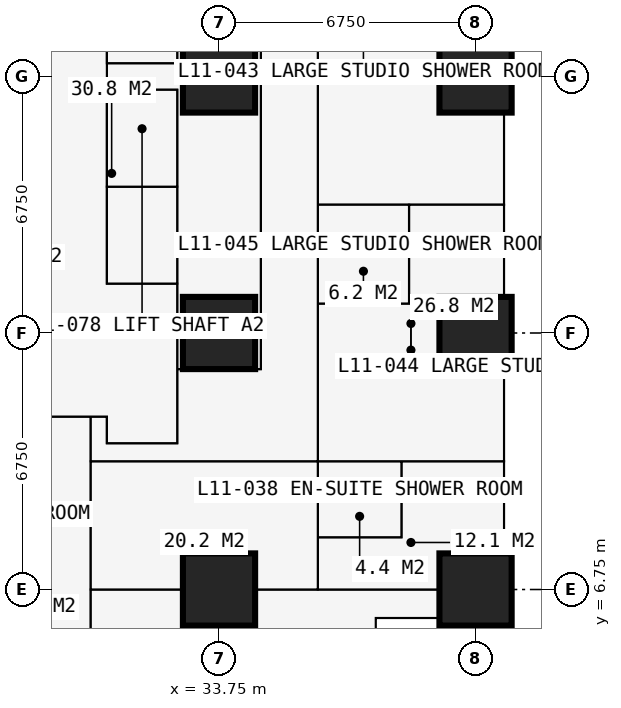
"""IFC4 building model, lengths in metres.
Left out: names, types, materials, properties, quantities, classifications, styles, units other than length and angle.
Written with IfcOpenShell. Run it as: python <this file> out.ifc"""

import sys

from ifc_helpers import new_model, si_unit, direction, frame, frame_2d, origin, origin_2d, place, context, subcontext, project, spatial, rectangle, extrude, element, fill, save


model = new_model("IFC4")
c1 = context("Model", 3, precision=1e-05, world=origin(), true_north=direction((0.0, 1.0)))
c2 = subcontext(c1, "Body", "Model", "MODEL_VIEW")
j1 = project(units=[si_unit("LENGTHUNIT", "METRE"), si_unit("PLANEANGLEUNIT", "RADIAN")], contexts=[c1])
p1 = place(None, origin())
s1 = spatial("IfcSite", under=j1, at=p1, CompositionType="ELEMENT")
p2 = place(p1, origin())
s2 = spatial("IfcBuilding", under=s1, at=p2, CompositionType="ELEMENT")
p3 = place(p2, frame((0.0, 0.0, 43.2)))
s3 = spatial("IfcBuildingStorey", under=s2, at=p3, CompositionType="ELEMENT", Elevation=43.2)
for number, where, z_axis, x_axis in (
    (1, (33.75, 6.75, 0.0), (0.0, 0.0, 1.0), (1.0, 0.0, 0.0)),
    (2, (33.75, 13.5, 0.0), (0.0, 0.0, 1.0), (1.0, 0.0, 0.0)),
    (3, (33.75, 20.25, 0.0), (0.0, 0.0, 1.0), (1.0, 0.0, 0.0)),
    (4, (40.5, 6.75, 0.0), (0.0, 0.0, 1.0), (1.0, 0.0, 0.0)),
    (5, (40.5, 13.5, 0.0), (0.0, 0.0, 1.0), (1.0, 0.0, 0.0)),
    (6, (40.5, 20.25, 0.0), (0.0, 0.0, 1.0), (1.0, 0.0, 0.0)),
):
    element("IfcColumn", number, at=place(p3, frame(where, z_axis=z_axis, x_axis=x_axis)), inside=s3, PredefinedType="COLUMN", context=c2, shape_type="SweptSolid", body=[
        extrude(rectangle(XDim=1.9, YDim=1.9, at=origin_2d()), origin(), (0.0, 0.0, 1.0), 3.6),
    ])
p4 = place(p3, frame((41.25, 27.0, 0.0), z_axis=(0.0, 0.0, 1.0), x_axis=(0.0, -1.0, 0.0)))
e7 = element("IfcWall", 7, at=p4, inside=s3, PredefinedType="SOLIDWALL", context=c2, shape_type="SweptSolid", body=[
    extrude(rectangle(XDim=6.75, YDim=0.15, at=frame_2d((3.375, 0.0))), origin(), (0.0, 0.0, 1.0), 3.375),
])
p5 = place(p4, frame((0.996, 0.0, 0.0)))
e8 = element("IfcOpeningElement", 8, at=p5, cuts=e7, PredefinedType="OPENING", context=c2, shape_type="SweptSolid", body=[
    extrude(rectangle(XDim=1.0, YDim=2.2, at=frame_2d((0.5, 1.1))), frame((0.0, 0.085, 0.0), z_axis=(0.0, -1.0, 0.0), x_axis=(1.0, 0.0, 0.0)), (0.0, 0.0, 1.0), 0.17),
])
p6 = place(p4, frame((2.042, 0.0, 0.9)))
e9 = element("IfcOpeningElement", 9, at=p6, cuts=e7, PredefinedType="OPENING", context=c2, shape_type="SweptSolid", body=[
    extrude(rectangle(XDim=1.2, YDim=1.8, at=frame_2d((0.6, 0.9))), frame((0.0, 0.085, 0.0), z_axis=(0.0, -1.0, 0.0), x_axis=(1.0, 0.0, 0.0)), (0.0, 0.0, 1.0), 0.17),
])
p7 = place(p4, frame((4.754, 0.0, 0.0)))
e10 = element("IfcOpeningElement", 10, at=p7, cuts=e7, PredefinedType="OPENING", context=c2, shape_type="SweptSolid", body=[
    extrude(rectangle(XDim=1.0, YDim=2.2, at=frame_2d((0.5, 1.1))), frame((0.0, 0.085, 0.0), z_axis=(0.0, -1.0, 0.0), x_axis=(1.0, 0.0, 0.0)), (0.0, 0.0, 1.0), 0.17),
])
p8 = place(p4, frame((3.508, 0.0, 0.9)))
e11 = element("IfcOpeningElement", 11, at=p8, cuts=e7, PredefinedType="OPENING", context=c2, shape_type="SweptSolid", body=[
    extrude(rectangle(XDim=1.2, YDim=1.8, at=frame_2d((0.6, 0.9))), frame((0.0, 0.085, 0.0), z_axis=(0.0, -1.0, 0.0), x_axis=(1.0, 0.0, 0.0)), (0.0, 0.0, 1.0), 0.17),
])
p9 = place(p3, frame((37.875, 2.625, 0.0), z_axis=(0.0, 0.0, 1.0), x_axis=(0.0, 1.0, 0.0)))
e12 = element("IfcWall", 12, at=p9, inside=s3, PredefinedType="SOLIDWALL", context=c2, shape_type="SweptSolid", body=[
    extrude(rectangle(XDim=3.375, YDim=0.3, at=frame_2d((1.688, 0.0))), origin(), (0.0, 0.0, 1.0), 3.375),
])
p10 = place(p9, frame((0.788, 0.0, 0.6)))
e13 = element("IfcOpeningElement", 13, at=p10, cuts=e12, PredefinedType="OPENING", context=c2, shape_type="SweptSolid", body=[
    extrude(rectangle(XDim=1.8, YDim=2.1, at=frame_2d((0.9, 1.05))), frame((0.0, 0.16, 0.0), z_axis=(0.0, -1.0, 0.0), x_axis=(1.0, 0.0, 0.0)), (0.0, 0.0, 1.0), 0.32),
])
p11 = place(p3, frame((37.875, 6.0, 0.0), z_axis=(0.0, 0.0, 1.0), x_axis=(1.0, 0.0, 0.0)))
e14 = element("IfcWall", 14, at=p11, inside=s3, PredefinedType="SOLIDWALL", context=c2, shape_type="SweptSolid", body=[
    extrude(rectangle(XDim=3.375, YDim=0.3, at=frame_2d((1.688, 0.0))), origin(), (0.0, 0.0, 1.0), 3.375),
])
p12 = place(p11, frame((0.317, 0.0, 0.9)))
e15 = element("IfcOpeningElement", 15, at=p12, cuts=e14, PredefinedType="OPENING", context=c2, shape_type="SweptSolid", body=[
    extrude(rectangle(XDim=1.2, YDim=1.8, at=frame_2d((0.6, 0.9))), frame((0.0, 0.16, 0.0), z_axis=(0.0, -1.0, 0.0), x_axis=(1.0, 0.0, 0.0)), (0.0, 0.0, 1.0), 0.32),
])
p13 = place(p3, frame((10.125, 11.3, 0.0), z_axis=(0.0, 0.0, 1.0), x_axis=(1.0, 0.0, 0.0)))
e16 = element("IfcWall", 16, at=p13, inside=s3, PredefinedType="PARTITIONING", context=c2, shape_type="SweptSolid", body=[
    extrude(rectangle(XDim=20.675, YDim=0.15, at=frame_2d((10.337, 0.0))), origin(), (0.0, 0.0, 1.0), 3.375),
])
p14 = place(p13, frame((8.375, 0.0, 0.0)))
e17 = element("IfcOpeningElement", 17, at=p14, cuts=e16, PredefinedType="OPENING", context=c2, shape_type="SweptSolid", body=[
    extrude(rectangle(XDim=1.0, YDim=2.2, at=frame_2d((0.5, 1.1))), frame((0.0, 0.085, 0.0), z_axis=(0.0, -1.0, 0.0), x_axis=(1.0, 0.0, 0.0)), (0.0, 0.0, 1.0), 0.17),
])
p15 = place(p13, frame((10.975, 0.0, 0.0)))
e18 = element("IfcOpeningElement", 18, at=p15, cuts=e16, PredefinedType="OPENING", context=c2, shape_type="SweptSolid", body=[
    extrude(rectangle(XDim=1.0, YDim=2.2, at=frame_2d((0.5, 1.1))), frame((0.0, 0.085, 0.0), z_axis=(0.0, -1.0, 0.0), x_axis=(1.0, 0.0, 0.0)), (0.0, 0.0, 1.0), 0.17),
])
p16 = place(p13, frame((3.925, 0.0, 0.0)))
e19 = element("IfcOpeningElement", 19, at=p16, cuts=e16, PredefinedType="OPENING", context=c2, shape_type="SweptSolid", body=[
    extrude(rectangle(XDim=0.95, YDim=2.2, at=frame_2d((0.475, 1.1))), frame((0.0, 0.085, 0.0), z_axis=(0.0, -1.0, 0.0), x_axis=(1.0, 0.0, 0.0)), (0.0, 0.0, 1.0), 0.17),
])
p17 = place(p3, frame((30.375, -0.734, 0.0), z_axis=(0.0, 0.0, 1.0), x_axis=(0.0, 1.0, 0.0)))
e20 = element("IfcWall", 20, at=p17, inside=s3, PredefinedType="PARTITIONING", context=c2, shape_type="SweptSolid", body=[
    extrude(rectangle(XDim=12.034, YDim=0.15, at=frame_2d((6.017, 0.0))), origin(), (0.0, 0.0, 1.0), 3.375),
])
p18 = place(p3, frame((30.375, 6.75, 0.0), z_axis=(0.0, 0.0, 1.0), x_axis=(1.0, 0.0, 0.0)))
e21 = element("IfcWall", 21, at=p18, inside=s3, PredefinedType="PARTITIONING", context=c2, shape_type="SweptSolid", body=[
    extrude(rectangle(XDim=10.859, YDim=0.15, at=frame_2d((5.429, 0.0))), origin(), (0.0, 0.0, 1.0), 2.877),
])
p19 = place(p18, frame((1.4, 0.0, 0.0)))
e22 = element("IfcOpeningElement", 22, at=p19, cuts=e21, PredefinedType="OPENING", context=c2, shape_type="SweptSolid", body=[
    extrude(rectangle(XDim=1.0, YDim=2.2, at=frame_2d((0.5, 1.1))), frame((0.0, 0.085, 0.0), z_axis=(0.0, -1.0, 0.0), x_axis=(1.0, 0.0, 0.0)), (0.0, 0.0, 1.0), 0.17),
])
p20 = place(p3, frame((30.375, 10.125, 0.0), z_axis=(0.0, 0.0, 1.0), x_axis=(1.0, 0.0, 0.0)))
e23 = element("IfcWall", 23, at=p20, inside=s3, PredefinedType="PARTITIONING", context=c2, shape_type="SweptSolid", body=[
    extrude(rectangle(XDim=10.859, YDim=0.15, at=frame_2d((5.429, 0.0))), origin(), (0.0, 0.0, 1.0), 3.375),
])
p21 = place(p20, frame((2.5, 0.0, 0.0)))
e24 = element("IfcOpeningElement", 24, at=p21, cuts=e23, PredefinedType="OPENING", context=c2, shape_type="SweptSolid", body=[
    extrude(rectangle(XDim=1.0, YDim=2.2, at=frame_2d((0.5, 1.1))), frame((0.0, 0.085, 0.0), z_axis=(0.0, -1.0, 0.0), x_axis=(1.0, 0.0, 0.0)), (0.0, 0.0, 1.0), 0.17),
])
p22 = place(p3, frame((30.8, 10.6, 0.0), z_axis=(0.0, 0.0, 1.0), x_axis=(0.0, 1.0, 0.0)))
e25 = element("IfcWall", 25, at=p22, inside=s3, PredefinedType="PARTITIONING", context=c2, shape_type="SweptSolid", body=[
    extrude(rectangle(XDim=0.7, YDim=0.15, at=frame_2d((0.35, 0.0))), origin(), (0.0, 0.0, 1.0), 3.375),
])
p23 = place(p3, frame((30.8, 10.6, 0.0), z_axis=(0.0, 0.0, 1.0), x_axis=(1.0, 0.0, 0.0)))
e26 = element("IfcWall", 26, at=p23, inside=s3, PredefinedType="PARTITIONING", context=c2, shape_type="SweptSolid", body=[
    extrude(rectangle(XDim=1.85, YDim=0.15, at=frame_2d((0.925, 0.0))), origin(), (0.0, 0.0, 1.0), 3.375),
])
p24 = place(p3, frame((30.8, 14.8, 0.0), z_axis=(0.0, 0.0, 1.0), x_axis=(0.0, 1.0, 0.0)))
e27 = element("IfcWall", 27, at=p24, inside=s3, PredefinedType="PARTITIONING", context=c2, shape_type="SweptSolid", body=[
    extrude(rectangle(XDim=10.9, YDim=0.15, at=frame_2d((5.45, 0.0))), origin(), (0.0, 0.0, 1.0), 3.375),
])
p25 = place(p24, frame((0.75, 0.0, 0.0)))
e28 = element("IfcOpeningElement", 28, at=p25, cuts=e27, PredefinedType="OPENING", context=c2, shape_type="SweptSolid", body=[
    extrude(rectangle(XDim=1.1, YDim=2.2, at=frame_2d((0.55, 1.1))), frame((0.0, 0.085, 0.0), z_axis=(0.0, -1.0, 0.0), x_axis=(1.0, 0.0, 0.0)), (0.0, 0.0, 1.0), 0.17),
])
p26 = place(p24, frame((3.25, 0.0, 0.0)))
e29 = element("IfcOpeningElement", 29, at=p26, cuts=e27, PredefinedType="OPENING", context=c2, shape_type="SweptSolid", body=[
    extrude(rectangle(XDim=1.1, YDim=2.2, at=frame_2d((0.55, 1.1))), frame((0.0, 0.085, 0.0), z_axis=(0.0, -1.0, 0.0), x_axis=(1.0, 0.0, 0.0)), (0.0, 0.0, 1.0), 0.17),
])
p27 = place(p24, frame((6.5, 0.0, 0.0)))
e30 = element("IfcOpeningElement", 30, at=p27, cuts=e27, PredefinedType="OPENING", context=c2, shape_type="SweptSolid", body=[
    extrude(rectangle(XDim=1.1, YDim=2.2, at=frame_2d((0.55, 1.1))), frame((0.0, 0.085, 0.0), z_axis=(0.0, -1.0, 0.0), x_axis=(1.0, 0.0, 0.0)), (0.0, 0.0, 1.0), 0.17),
])
p28 = place(p24, frame((9.05, 0.0, 0.0)))
e31 = element("IfcOpeningElement", 31, at=p28, cuts=e27, PredefinedType="OPENING", context=c2, shape_type="SweptSolid", body=[
    extrude(rectangle(XDim=1.1, YDim=2.2, at=frame_2d((0.55, 1.1))), frame((0.0, 0.085, 0.0), z_axis=(0.0, -1.0, 0.0), x_axis=(1.0, 0.0, 0.0)), (0.0, 0.0, 1.0), 0.17),
])
for number, where, z_axis, x_axis in (
    (32, (30.8, 14.8, 0.0), (0.0, 0.0, 1.0), (1.0, 0.0, 0.0)),
    (33, (30.8, 17.35, 0.0), (0.0, 0.0, 1.0), (1.0, 0.0, 0.0)),
    (34, (30.8, 19.9, 0.0), (0.0, 0.0, 1.0), (1.0, 0.0, 0.0)),
    (35, (30.8, 20.6, 0.0), (0.0, 0.0, 1.0), (1.0, 0.0, 0.0)),
):
    element("IfcWall", number, at=place(p3, frame(where, z_axis=z_axis, x_axis=x_axis)), inside=s3, PredefinedType="SHEAR", context=c2, shape_type="SweptSolid", body=[
        extrude(rectangle(XDim=1.85, YDim=0.1, at=frame_2d((0.925, 0.0))), origin(), (0.0, 0.0, 1.0), 3.375),
    ])
p29 = place(p3, frame((32.65, 10.6, 0.0), z_axis=(0.0, 0.0, 1.0), x_axis=(0.0, 1.0, 0.0)))
e36 = element("IfcWall", 36, at=p29, inside=s3, PredefinedType="SHEAR", context=c2, shape_type="SweptSolid", body=[
    extrude(rectangle(XDim=9.3, YDim=0.1, at=frame_2d((4.65, 0.0))), origin(), (0.0, 0.0, 1.0), 3.375),
])
p30 = place(p29, frame((0.5, 0.0, 0.0)))
e37 = element("IfcOpeningElement", 37, at=p30, cuts=e36, PredefinedType="OPENING", context=c2, shape_type="SweptSolid", body=[
    extrude(rectangle(XDim=1.0, YDim=2.2, at=frame_2d((0.5, 1.1))), frame((0.0, 0.06, 0.0), z_axis=(0.0, -1.0, 0.0), x_axis=(1.0, 0.0, 0.0)), (0.0, 0.0, 1.0), 0.12),
])
p31 = place(p3, frame((32.65, 12.55, 0.0), z_axis=(0.0, 0.0, 1.0), x_axis=(1.0, 0.0, 0.0)))
e38 = element("IfcWall", 38, at=p31, inside=s3, PredefinedType="PARTITIONING", context=c2, shape_type="SweptSolid", body=[
    extrude(rectangle(XDim=2.2, YDim=0.15, at=frame_2d((1.1, 0.0))), origin(), (0.0, 0.0, 1.0), 3.375),
])
p32 = place(p3, frame((32.65, 20.6, 0.0), z_axis=(0.0, 0.0, 1.0), x_axis=(0.0, 1.0, 0.0)))
e39 = element("IfcWall", 39, at=p32, inside=s3, PredefinedType="PARTITIONING", context=c2, shape_type="SweptSolid", body=[
    extrude(rectangle(XDim=5.1, YDim=0.15, at=frame_2d((2.55, 0.0))), origin(), (0.0, 0.0, 1.0), 3.375),
])
p33 = place(p3, frame((34.85, 12.55, 0.0), z_axis=(0.0, 0.0, 1.0), x_axis=(0.0, 1.0, 0.0)))
e40 = element("IfcWall", 40, at=p33, inside=s3, PredefinedType="PARTITIONING", context=c2, shape_type="SweptSolid", body=[
    extrude(rectangle(XDim=17.825, YDim=0.15, at=frame_2d((8.913, 0.0))), origin(), (0.0, 0.0, 1.0), 3.375),
])
p34 = place(p33, frame((8.65, 0.0, 0.0)))
e41 = element("IfcOpeningElement", 41, at=p34, cuts=e40, PredefinedType="OPENING", context=c2, shape_type="SweptSolid", body=[
    extrude(rectangle(XDim=0.95, YDim=2.2, at=frame_2d((0.475, 1.1))), frame((0.0, 0.085, 0.0), z_axis=(0.0, -1.0, 0.0), x_axis=(1.0, 0.0, 0.0)), (0.0, 0.0, 1.0), 0.17),
])
p35 = place(p3, frame((36.35, 6.75, 0.0), z_axis=(0.0, 0.0, 1.0), x_axis=(0.0, 1.0, 0.0)))
e42 = element("IfcWall", 42, at=p35, inside=s3, PredefinedType="PARTITIONING", context=c2, shape_type="SweptSolid", body=[
    extrude(rectangle(XDim=23.625, YDim=0.15, at=frame_2d((11.812, 0.0))), origin(), (0.0, 0.0, 1.0), 3.375),
])
p36 = place(p35, frame((0.2, 0.0, 0.0)))
e43 = element("IfcOpeningElement", 43, at=p36, cuts=e42, PredefinedType="OPENING", context=c2, shape_type="SweptSolid", body=[
    extrude(rectangle(XDim=0.95, YDim=2.2, at=frame_2d((0.475, 1.1))), frame((0.0, 0.085, 0.0), z_axis=(0.0, -1.0, 0.0), x_axis=(1.0, 0.0, 0.0)), (0.0, 0.0, 1.0), 0.17),
])
p37 = place(p35, frame((18.475, 0.0, 0.0)))
e44 = element("IfcOpeningElement", 44, at=p37, cuts=e42, PredefinedType="OPENING", context=c2, shape_type="SweptSolid", body=[
    extrude(rectangle(XDim=0.95, YDim=2.2, at=frame_2d((0.475, 1.1))), frame((0.0, 0.085, 0.0), z_axis=(0.0, -1.0, 0.0), x_axis=(1.0, 0.0, 0.0)), (0.0, 0.0, 1.0), 0.17),
])
p38 = place(p35, frame((11.725, 0.0, 0.0)))
e45 = element("IfcOpeningElement", 45, at=p38, cuts=e42, PredefinedType="OPENING", context=c2, shape_type="SweptSolid", body=[
    extrude(rectangle(XDim=0.95, YDim=2.2, at=frame_2d((0.475, 1.1))), frame((0.0, 0.085, 0.0), z_axis=(0.0, -1.0, 0.0), x_axis=(1.0, 0.0, 0.0)), (0.0, 0.0, 1.0), 0.17),
])
p39 = place(p35, frame((4.975, 0.0, 0.0)))
e46 = element("IfcOpeningElement", 46, at=p39, cuts=e42, PredefinedType="OPENING", context=c2, shape_type="SweptSolid", body=[
    extrude(rectangle(XDim=0.95, YDim=2.2, at=frame_2d((0.475, 1.1))), frame((0.0, 0.085, 0.0), z_axis=(0.0, -1.0, 0.0), x_axis=(1.0, 0.0, 0.0)), (0.0, 0.0, 1.0), 0.17),
])
p40 = place(p3, frame((36.35, 8.125, 0.0), z_axis=(0.0, 0.0, 1.0), x_axis=(1.0, 0.0, 0.0)))
e47 = element("IfcWall", 47, at=p40, inside=s3, PredefinedType="PARTITIONING", context=c2, shape_type="SweptSolid", body=[
    extrude(rectangle(XDim=2.2, YDim=0.1, at=frame_2d((1.1, 0.0))), origin(), (0.0, 0.0, 1.0), 3.375),
])
p41 = place(p40, frame((0.65, 0.0, 0.0)))
e48 = element("IfcOpeningElement", 48, at=p41, cuts=e47, PredefinedType="OPENING", context=c2, shape_type="SweptSolid", body=[
    extrude(rectangle(XDim=0.9, YDim=2.2, at=frame_2d((0.45, 1.1))), frame((0.0, 0.06, 0.0), z_axis=(0.0, -1.0, 0.0), x_axis=(1.0, 0.0, 0.0)), (0.0, 0.0, 1.0), 0.12),
])
p42 = place(p3, frame((36.35, 14.275, 0.0), z_axis=(0.0, 0.0, 1.0), x_axis=(1.0, 0.0, 0.0)))
e49 = element("IfcWall", 49, at=p42, inside=s3, PredefinedType="PARTITIONING", context=c2, shape_type="SweptSolid", body=[
    extrude(rectangle(XDim=2.4, YDim=0.1, at=frame_2d((1.2, 0.0))), origin(), (0.0, 0.0, 1.0), 3.375),
])
p43 = place(p3, frame((36.35, 16.875, 0.0), z_axis=(0.0, 0.0, 1.0), x_axis=(1.0, 0.0, 0.0)))
e50 = element("IfcWall", 50, at=p43, inside=s3, PredefinedType="PARTITIONING", context=c2, shape_type="SweptSolid", body=[
    extrude(rectangle(XDim=4.884, YDim=0.175, at=frame_2d((2.442, 0.0))), origin(), (0.0, 0.0, 1.0), 3.375),
])
p44 = place(p43, frame((0.75, 0.0, 0.0)))
e51 = element("IfcOpeningElement", 51, at=p44, cuts=e50, PredefinedType="OPENING", context=c2, shape_type="SweptSolid", body=[
    extrude(rectangle(XDim=0.9, YDim=2.2, at=frame_2d((0.45, 1.1))), frame((0.0, 0.097, 0.0), z_axis=(0.0, -1.0, 0.0), x_axis=(1.0, 0.0, 0.0)), (0.0, 0.0, 1.0), 0.195),
])
p45 = place(p3, frame((38.55, 8.125, 0.0), z_axis=(0.0, 0.0, 1.0), x_axis=(0.0, 1.0, 0.0)))
e52 = element("IfcWall", 52, at=p45, inside=s3, PredefinedType="PARTITIONING", context=c2, shape_type="SweptSolid", body=[
    extrude(rectangle(XDim=2.0, YDim=0.1, at=frame_2d((1.0, 0.0))), origin(), (0.0, 0.0, 1.0), 3.375),
])
p46 = place(p3, frame((38.75, 14.275, 0.0), z_axis=(0.0, 0.0, 1.0), x_axis=(0.0, 1.0, 0.0)))
e53 = element("IfcWall", 53, at=p46, inside=s3, PredefinedType="PARTITIONING", context=c2, shape_type="SweptSolid", body=[
    extrude(rectangle(XDim=2.6, YDim=0.1, at=frame_2d((1.3, 0.0))), origin(), (0.0, 0.0, 1.0), 3.375),
])
p47 = place(p12, origin())
e54 = element("IfcWindow", 54, at=p47, inside=s3, PartitioningType="SINGLE_PANEL", PredefinedType="WINDOW", context=c2, shape_type="SweptSolid", body=[
    extrude(rectangle(XDim=1.2, YDim=1.8, at=frame_2d((0.6, 0.9))), frame((0.0, 0.03, 0.0), z_axis=(0.0, -1.0, 0.0), x_axis=(1.0, 0.0, 0.0)), (0.0, 0.0, 1.0), 0.06),
])
fill(e15, e54)
p48 = place(p19, origin())
e55 = element("IfcDoor", 55, at=p48, inside=s3, OperationType="SINGLE_SWING_LEFT", PredefinedType="DOOR", context=c2, shape_type="SweptSolid", body=[
    extrude(rectangle(XDim=1.0, YDim=2.2, at=frame_2d((0.5, 1.1))), frame((0.0, 0.025, 0.0), z_axis=(0.0, -1.0, 0.0), x_axis=(1.0, 0.0, 0.0)), (0.0, 0.0, 1.0), 0.05),
])
fill(e22, e55)
p49 = place(p36, origin())
e56 = element("IfcDoor", 56, at=p49, inside=s3, OperationType="SINGLE_SWING_LEFT", PredefinedType="DOOR", context=c2, shape_type="SweptSolid", body=[
    extrude(rectangle(XDim=0.95, YDim=2.2, at=frame_2d((0.475, 1.1))), frame((0.0, 0.025, 0.0), z_axis=(0.0, -1.0, 0.0), x_axis=(1.0, 0.0, 0.0)), (0.0, 0.0, 1.0), 0.05),
])
fill(e43, e56)
p50 = place(p41, origin())
e57 = element("IfcDoor", 57, at=p50, inside=s3, OperationType="SINGLE_SWING_RIGHT", PredefinedType="DOOR", context=c2, shape_type="SweptSolid", body=[
    extrude(rectangle(XDim=0.9, YDim=2.2, at=frame_2d((0.45, 1.1))), frame((0.0, 0.025, 0.0), z_axis=(0.0, -1.0, 0.0), x_axis=(1.0, 0.0, 0.0)), (0.0, 0.0, 1.0), 0.05),
])
fill(e48, e57)
p51 = place(p21, origin())
e58 = element("IfcDoor", 58, at=p51, inside=s3, OperationType="SINGLE_SWING_LEFT", PredefinedType="DOOR", context=c2, shape_type="SweptSolid", body=[
    extrude(rectangle(XDim=1.0, YDim=2.2, at=frame_2d((0.5, 1.1))), frame((0.0, 0.025, 0.0), z_axis=(0.0, -1.0, 0.0), x_axis=(1.0, 0.0, 0.0)), (0.0, 0.0, 1.0), 0.05),
])
fill(e24, e58)
p52 = place(p38, origin())
e59 = element("IfcDoor", 59, at=p52, inside=s3, OperationType="SINGLE_SWING_LEFT", PredefinedType="DOOR", context=c2, shape_type="SweptSolid", body=[
    extrude(rectangle(XDim=0.95, YDim=2.2, at=frame_2d((0.475, 1.1))), frame((0.0, 0.025, 0.0), z_axis=(0.0, -1.0, 0.0), x_axis=(1.0, 0.0, 0.0)), (0.0, 0.0, 1.0), 0.05),
])
fill(e45, e59)
p53 = place(p39, origin())
e60 = element("IfcDoor", 60, at=p53, inside=s3, OperationType="SINGLE_SWING_LEFT", PredefinedType="DOOR", context=c2, shape_type="SweptSolid", body=[
    extrude(rectangle(XDim=0.95, YDim=2.2, at=frame_2d((0.475, 1.1))), frame((0.0, 0.025, 0.0), z_axis=(0.0, -1.0, 0.0), x_axis=(1.0, 0.0, 0.0)), (0.0, 0.0, 1.0), 0.05),
])
fill(e46, e60)
p54 = place(p44, origin())
e61 = element("IfcDoor", 61, at=p54, inside=s3, OperationType="SINGLE_SWING_RIGHT", PredefinedType="DOOR", context=c2, shape_type="SweptSolid", body=[
    extrude(rectangle(XDim=0.9, YDim=2.2, at=frame_2d((0.45, 1.1))), frame((0.0, 0.025, 0.0), z_axis=(0.0, -1.0, 0.0), x_axis=(1.0, 0.0, 0.0)), (0.0, 0.0, 1.0), 0.05),
])
fill(e51, e61)
p55 = place(p30, origin())
e62 = element("IfcDoor", 62, at=p55, inside=s3, OperationType="SINGLE_SWING_LEFT", PredefinedType="DOOR", context=c2, shape_type="SweptSolid", body=[
    extrude(rectangle(XDim=1.0, YDim=2.2, at=frame_2d((0.5, 1.1))), frame((0.0, 0.025, 0.0), z_axis=(0.0, -1.0, 0.0), x_axis=(1.0, 0.0, 0.0)), (0.0, 0.0, 1.0), 0.05),
])
fill(e37, e62)
p56 = place(p25, origin())
e63 = element("IfcDoor", 63, at=p56, inside=s3, OperationType="DOUBLE_DOOR_SLIDING", PredefinedType="DOOR", context=c2, shape_type="SweptSolid", body=[
    extrude(rectangle(XDim=1.1, YDim=2.2, at=frame_2d((0.55, 1.1))), frame((0.0, 0.025, 0.0), z_axis=(0.0, -1.0, 0.0), x_axis=(1.0, 0.0, 0.0)), (0.0, 0.0, 1.0), 0.05),
])
fill(e28, e63)
p57 = place(p26, origin())
e64 = element("IfcDoor", 64, at=p57, inside=s3, OperationType="DOUBLE_DOOR_SLIDING", PredefinedType="DOOR", context=c2, shape_type="SweptSolid", body=[
    extrude(rectangle(XDim=1.1, YDim=2.2, at=frame_2d((0.55, 1.1))), frame((0.0, 0.025, 0.0), z_axis=(0.0, -1.0, 0.0), x_axis=(1.0, 0.0, 0.0)), (0.0, 0.0, 1.0), 0.05),
])
fill(e29, e64)
save(model, sys.argv[1])
